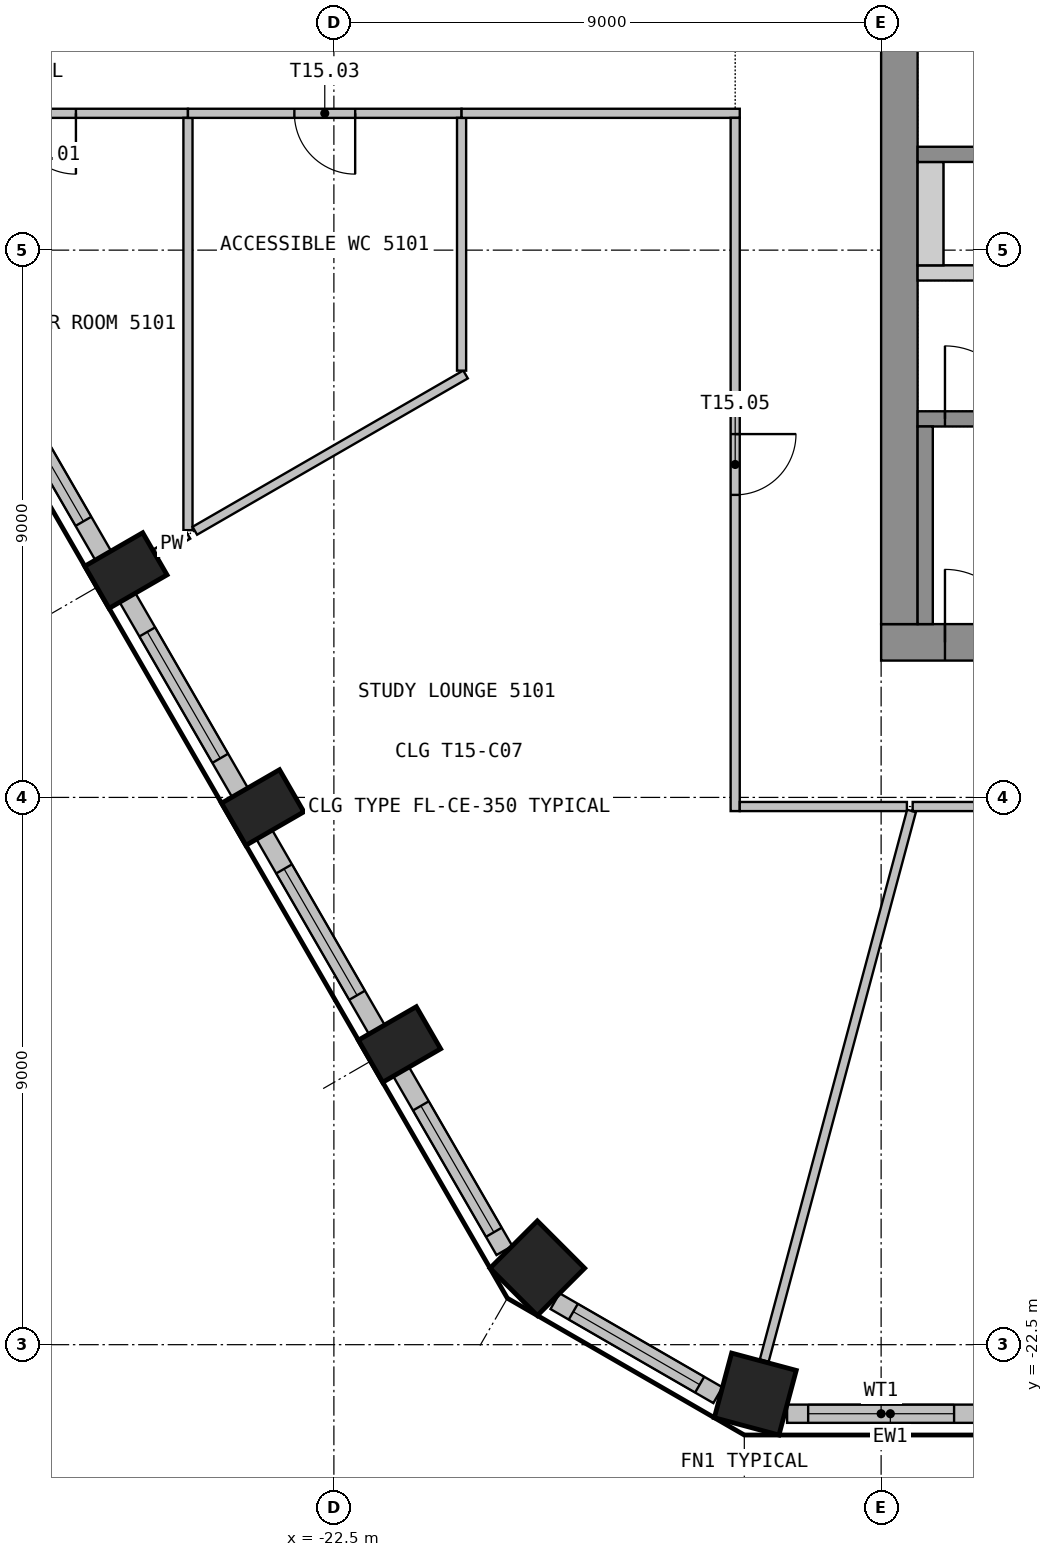
"""IFC4 building model, lengths in metres.
Left out: names, types, materials, properties, quantities, classifications, styles, units other than length and angle.
Written with IfcOpenShell. Run it as: python <this file> out.ifc"""

import sys

from ifc_helpers import new_model, si_unit, direction, frame, frame_2d, origin, origin_2d, place, context, subcontext, project, spatial, polyline, rectangle, outline, extrude, element, fill, save


model = new_model("IFC4")
c1 = context("Model", 3, precision=1e-05, world=origin(), true_north=direction((0.0, 1.0)))
c2 = subcontext(c1, "Body", "Model", "MODEL_VIEW")
j1 = project(units=[si_unit("LENGTHUNIT", "METRE"), si_unit("PLANEANGLEUNIT", "RADIAN")], contexts=[c1])
p1 = place(None, origin())
s1 = spatial("IfcSite", under=j1, at=p1, CompositionType="ELEMENT")
p2 = place(p1, origin())
s2 = spatial("IfcBuilding", under=s1, at=p2, CompositionType="ELEMENT")
p3 = place(p2, frame((0.0, 0.0, 207.3)))
s3 = spatial("IfcBuildingStorey", under=s2, at=p3, CompositionType="ELEMENT", Elevation=207.3)
p4 = place(p3, frame((-15.57, -23.312, 0.0), z_axis=(0.0, 0.0, 1.0), x_axis=(0.965925826289, -0.258819045103, 0.0)))
e1 = element("IfcColumn", 1, at=p4, inside=s3, PredefinedType="COLUMN", context=c2, shape_type="SweptSolid", body=[
    extrude(rectangle(XDim=1.1, YDim=1.1, at=origin_2d()), origin(), (0.0, 0.0, 1.0), 3.55),
])
for number, where, z_axis, x_axis in (
    (2, (-25.921, -9.769, 0.0), (0.0, 0.0, 1.0), (0.5, -0.866, 0.0)),
    (3, (-23.671, -13.666, 0.0), (0.0, 0.0, 1.0), (0.5, -0.866, 0.0)),
    (4, (-21.421, -17.563, 0.0), (0.0, 0.0, 1.0), (0.5, -0.866, 0.0)),
):
    element("IfcColumn", number, at=place(p3, frame(where, z_axis=z_axis, x_axis=x_axis)), inside=s3, PredefinedType="COLUMN", context=c2, shape_type="SweptSolid", body=[
        extrude(rectangle(XDim=0.8, YDim=1.1, at=origin_2d()), origin(), (0.0, 0.0, 1.0), 3.55),
    ])
p5 = place(p3, frame((-19.154, -21.242, 0.0), z_axis=(0.0, 0.0, 1.0), x_axis=(0.707106781187, -0.707106781187, 0.0)))
e5 = element("IfcColumn", 5, at=p5, inside=s3, PredefinedType="COLUMN", context=c2, shape_type="SweptSolid", body=[
    extrude(rectangle(XDim=1.1, YDim=1.1, at=origin_2d()), origin(), (0.0, 0.0, 1.0), 3.55),
])
p6 = place(p3, frame((-15.046, -23.635, 0.0), z_axis=(0.0, 0.0, 1.0), x_axis=(1.0, 0.0, 0.0)))
e6 = element("IfcWall", 6, at=p6, inside=s3, PredefinedType="SOLIDWALL", context=c2, shape_type="SweptSolid", body=[
    extrude(rectangle(XDim=3.396, YDim=0.3, at=frame_2d((1.698, 0.0))), origin(), (0.0, 0.0, 1.0), 3.55),
])
p7 = place(p6, frame((0.346, 0.0, 0.9)))
e7 = element("IfcOpeningElement", 7, at=p7, cuts=e6, PredefinedType="OPENING", context=c2, shape_type="SweptSolid", body=[
    extrude(rectangle(XDim=2.4, YDim=2.1, at=frame_2d((1.2, 1.05))), frame((0.0, 0.16, 0.0), z_axis=(0.0, -1.0, 0.0), x_axis=(1.0, 0.0, 0.0)), (0.0, 0.0, 1.0), 0.32),
])
p8 = place(p3, frame((-28.144, -6.319, 0.0), z_axis=(0.0, 0.0, 1.0), x_axis=(0.500029062817, -0.866008623709, 0.0)))
e8 = element("IfcWall", 8, at=p8, inside=s3, PredefinedType="SOLIDWALL", context=c2, shape_type="SweptSolid", body=[
    extrude(rectangle(XDim=3.699, YDim=0.3, at=frame_2d((1.85, 0.0))), origin(), (0.0, 0.0, 1.0), 3.55),
])
p9 = place(p8, frame((0.649, 0.0, 0.9)))
e9 = element("IfcOpeningElement", 9, at=p9, cuts=e8, PredefinedType="OPENING", context=c2, shape_type="SweptSolid", body=[
    extrude(rectangle(XDim=2.4, YDim=2.1, at=frame_2d((1.2, 1.05))), frame((0.0, 0.16, 0.0), z_axis=(0.0, -1.0, 0.0), x_axis=(1.0, 0.0, 0.0)), (0.0, 0.0, 1.0), 0.32),
])
p10 = place(p3, frame((-25.894, -10.216, 0.0), z_axis=(0.0, 0.0, 1.0), x_axis=(0.500029062817, -0.866008623709, 0.0)))
e10 = element("IfcWall", 10, at=p10, inside=s3, PredefinedType="SOLIDWALL", context=c2, shape_type="SweptSolid", body=[
    extrude(rectangle(XDim=3.699, YDim=0.3, at=frame_2d((1.85, 0.0))), origin(), (0.0, 0.0, 1.0), 3.55),
])
p11 = place(p10, frame((0.649, 0.0, 0.9)))
e11 = element("IfcOpeningElement", 11, at=p11, cuts=e10, PredefinedType="OPENING", context=c2, shape_type="SweptSolid", body=[
    extrude(rectangle(XDim=2.4, YDim=2.1, at=frame_2d((1.2, 1.05))), frame((0.0, 0.16, 0.0), z_axis=(0.0, -1.0, 0.0), x_axis=(1.0, 0.0, 0.0)), (0.0, 0.0, 1.0), 0.32),
])
p12 = place(p3, frame((-23.644, -14.113, 0.0), z_axis=(0.0, 0.0, 1.0), x_axis=(0.500029062817, -0.866008623709, 0.0)))
e12 = element("IfcWall", 12, at=p12, inside=s3, PredefinedType="SOLIDWALL", context=c2, shape_type="SweptSolid", body=[
    extrude(rectangle(XDim=3.699, YDim=0.3, at=frame_2d((1.85, 0.0))), origin(), (0.0, 0.0, 1.0), 3.55),
])
p13 = place(p12, frame((0.649, 0.0, 0.9)))
e13 = element("IfcOpeningElement", 13, at=p13, cuts=e12, PredefinedType="OPENING", context=c2, shape_type="SweptSolid", body=[
    extrude(rectangle(XDim=2.4, YDim=2.1, at=frame_2d((1.2, 1.05))), frame((0.0, 0.16, 0.0), z_axis=(0.0, -1.0, 0.0), x_axis=(1.0, 0.0, 0.0)), (0.0, 0.0, 1.0), 0.32),
])
p14 = place(p3, frame((-21.394, -18.01, 0.0), z_axis=(0.0, 0.0, 1.0), x_axis=(0.500012868213, -0.866017974191, 0.0)))
e14 = element("IfcWall", 14, at=p14, inside=s3, PredefinedType="SOLIDWALL", context=c2, shape_type="SweptSolid", body=[
    extrude(rectangle(XDim=3.396, YDim=0.3, at=frame_2d((1.698, 0.0))), origin(), (0.0, 0.0, 1.0), 3.55),
])
p15 = place(p14, frame((0.649, 0.0, 0.9)))
e15 = element("IfcOpeningElement", 15, at=p15, cuts=e14, PredefinedType="OPENING", context=c2, shape_type="SweptSolid", body=[
    extrude(rectangle(XDim=2.4, YDim=2.1, at=frame_2d((1.2, 1.05))), frame((0.0, 0.16, 0.0), z_axis=(0.0, -1.0, 0.0), x_axis=(1.0, 0.0, 0.0)), (0.0, 0.0, 1.0), 0.32),
])
p16 = place(p3, frame((-18.863, -21.784, 0.0), z_axis=(0.0, 0.0, 1.0), x_axis=(0.865994975416, -0.500052699777, 0.0)))
e16 = element("IfcWall", 16, at=p16, inside=s3, PredefinedType="SOLIDWALL", context=c2, shape_type="SweptSolid", body=[
    extrude(rectangle(XDim=3.093, YDim=0.3, at=frame_2d((1.546, 0.0))), origin(), (0.0, 0.0, 1.0), 3.55),
])
p17 = place(p16, frame((0.346, 0.0, 0.9)))
e17 = element("IfcOpeningElement", 17, at=p17, cuts=e16, PredefinedType="OPENING", context=c2, shape_type="SweptSolid", body=[
    extrude(rectangle(XDim=2.4, YDim=2.1, at=frame_2d((1.2, 1.05))), frame((0.0, 0.16, 0.0), z_axis=(0.0, -1.0, 0.0), x_axis=(1.0, 0.0, 0.0)), (0.0, 0.0, 1.0), 0.32),
])
p18 = place(p3, frame((-13.5, -10.95, 0.0), z_axis=(0.0, 0.0, 1.0), x_axis=(1.0, 0.0, 0.0)))
e18 = element("IfcWall", 18, at=p18, inside=s3, PredefinedType="SHEAR", context=c2, shape_type="SweptSolid", body=[
    extrude(rectangle(XDim=27.0, YDim=0.6, at=frame_2d((13.5, 0.0))), origin(), (0.0, 0.0, 1.0), 3.55),
])
p19 = place(p18, frame((12.3, 0.0, 0.0)))
e19 = element("IfcOpeningElement", 19, at=p19, cuts=e18, PredefinedType="OPENING", context=c2, shape_type="SweptSolid", body=[
    extrude(rectangle(XDim=2.4, YDim=2.1, at=frame_2d((1.2, 1.05))), frame((0.0, 0.31, 0.0), z_axis=(0.0, -1.0, 0.0), x_axis=(1.0, 0.0, 0.0)), (0.0, 0.0, 1.0), 0.62),
])
p20 = place(p18, frame((1.05, 0.0, 0.0)))
e20 = element("IfcOpeningElement", 20, at=p20, cuts=e18, PredefinedType="OPENING", context=c2, shape_type="SweptSolid", body=[
    extrude(rectangle(XDim=1.2, YDim=2.1, at=frame_2d((0.6, 1.05))), frame((0.0, 0.31, 0.0), z_axis=(0.0, -1.0, 0.0), x_axis=(1.0, 0.0, 0.0)), (0.0, 0.0, 1.0), 0.62),
])
p21 = place(p18, frame((24.75, 0.0, 0.0)))
e21 = element("IfcOpeningElement", 21, at=p21, cuts=e18, PredefinedType="OPENING", context=c2, shape_type="SweptSolid", body=[
    extrude(rectangle(XDim=1.2, YDim=2.1, at=frame_2d((0.6, 1.05))), frame((0.0, 0.31, 0.0), z_axis=(0.0, -1.0, 0.0), x_axis=(1.0, 0.0, 0.0)), (0.0, 0.0, 1.0), 0.62),
])
p22 = place(p3, frame((-13.2, -10.65, 0.0), z_axis=(0.0, 0.0, 1.0), x_axis=(0.0, 1.0, 0.0)))
e22 = element("IfcWall", 22, at=p22, inside=s3, PredefinedType="SHEAR", context=c2, shape_type="SweptSolid", body=[
    extrude(rectangle(XDim=21.3, YDim=0.6, at=frame_2d((10.65, 0.0))), origin(), (0.0, 0.0, 1.0), 3.55),
])
p23 = place(p22, frame((9.45, 0.0, 0.0)))
e23 = element("IfcOpeningElement", 23, at=p23, cuts=e22, PredefinedType="OPENING", context=c2, shape_type="SweptSolid", body=[
    extrude(rectangle(XDim=2.4, YDim=2.1, at=frame_2d((1.2, 1.05))), frame((0.0, 0.31, 0.0), z_axis=(0.0, -1.0, 0.0), x_axis=(1.0, 0.0, 0.0)), (0.0, 0.0, 1.0), 0.62),
])
p24 = place(p3, origin())
e24 = element("IfcWall", 24, at=p24, inside=s3, PredefinedType="SHEAR", context=c2, shape_type="SweptSolid", body=[
    extrude(outline(polyline([(-12.9, -5.0), (-4.075, -5.0), (-4.075, -4.75), (-12.9, -4.75), (-12.9, -5.0)])), origin(), (0.0, 0.0, 1.0), 3.55),
])
p25 = place(p3, origin())
e25 = element("IfcWall", 25, at=p25, inside=s3, PredefinedType="SHEAR", context=c2, shape_type="SweptSolid", body=[
    extrude(outline(polyline([(-12.9, -4.75), (-12.475, -4.75), (-12.475, -3.05), (-12.9, -3.05), (-12.9, -4.75)])), origin(), (0.0, 0.0, 1.0), 3.55),
])
p26 = place(p3, frame((-12.9, -2.925, 0.0), z_axis=(0.0, 0.0, 1.0), x_axis=(1.0, 0.0, 0.0)))
e26 = element("IfcWall", 26, at=p26, inside=s3, PredefinedType="SHEAR", context=c2, shape_type="SweptSolid", body=[
    extrude(rectangle(XDim=8.825, YDim=0.25, at=frame_2d((4.413, 0.0))), origin(), (0.0, 0.0, 1.0), 3.55),
])
p27 = place(p26, frame((1.1, 0.0, 0.0)))
e27 = element("IfcOpeningElement", 27, at=p27, cuts=e26, PredefinedType="OPENING", context=c2, shape_type="SweptSolid", body=[
    extrude(rectangle(XDim=1.2, YDim=2.1, at=frame_2d((0.6, 1.05))), frame((0.0, 0.135, 0.0), z_axis=(0.0, -1.0, 0.0), x_axis=(1.0, 0.0, 0.0)), (0.0, 0.0, 1.0), 0.27),
])
p28 = place(p26, frame((3.9, 0.0, 0.0)))
e28 = element("IfcOpeningElement", 28, at=p28, cuts=e26, PredefinedType="OPENING", context=c2, shape_type="SweptSolid", body=[
    extrude(rectangle(XDim=1.2, YDim=2.1, at=frame_2d((0.6, 1.05))), frame((0.0, 0.135, 0.0), z_axis=(0.0, -1.0, 0.0), x_axis=(1.0, 0.0, 0.0)), (0.0, 0.0, 1.0), 0.27),
])
p29 = place(p26, frame((6.7, 0.0, 0.0)))
e29 = element("IfcOpeningElement", 29, at=p29, cuts=e26, PredefinedType="OPENING", context=c2, shape_type="SweptSolid", body=[
    extrude(rectangle(XDim=1.2, YDim=2.1, at=frame_2d((0.6, 1.05))), frame((0.0, 0.135, 0.0), z_axis=(0.0, -1.0, 0.0), x_axis=(1.0, 0.0, 0.0)), (0.0, 0.0, 1.0), 0.27),
])
p30 = place(p3, frame((-12.9, -7.275, 0.0), z_axis=(0.0, 0.0, 1.0), x_axis=(1.0, 0.0, 0.0)))
e30 = element("IfcWall", 30, at=p30, inside=s3, PredefinedType="SHEAR", context=c2, shape_type="SweptSolid", body=[
    extrude(rectangle(XDim=10.1, YDim=0.25, at=frame_2d((5.05, 0.0))), origin(), (0.0, 0.0, 1.0), 3.55),
])
p31 = place(p30, frame((0.45, 0.0, 0.0)))
e31 = element("IfcOpeningElement", 31, at=p31, cuts=e30, PredefinedType="OPENING", context=c2, shape_type="SweptSolid", body=[
    extrude(rectangle(XDim=1.2, YDim=2.1, at=frame_2d((0.6, 1.05))), frame((0.0, 0.135, 0.0), z_axis=(0.0, -1.0, 0.0), x_axis=(1.0, 0.0, 0.0)), (0.0, 0.0, 1.0), 0.27),
])
p32 = place(p3, frame((-12.775, -10.65, 0.0), z_axis=(0.0, 0.0, 1.0), x_axis=(0.0, 1.0, 0.0)))
e32 = element("IfcWall", 32, at=p32, inside=s3, PredefinedType="SHEAR", context=c2, shape_type="SweptSolid", body=[
    extrude(rectangle(XDim=3.25, YDim=0.25, at=frame_2d((1.625, 0.0))), origin(), (0.0, 0.0, 1.0), 3.55),
])
p33 = place(p3, frame((-24.9, -2.25, 0.0), z_axis=(0.0, 0.0, 1.0), x_axis=(-1.0, 0.0, 0.0)))
e33 = element("IfcWall", 33, at=p33, inside=s3, PredefinedType="PARTITIONING", context=c2, shape_type="SweptSolid", body=[
    extrude(rectangle(XDim=4.685, YDim=0.15, at=frame_2d((2.343, 0.0))), origin(), (0.0, 0.0, 1.0), 3.55),
])
p34 = place(p33, frame((1.843, 0.0, 0.0)))
e34 = element("IfcOpeningElement", 34, at=p34, cuts=e33, PredefinedType="OPENING", context=c2, shape_type="SweptSolid", body=[
    extrude(rectangle(XDim=1.0, YDim=2.1, at=frame_2d((0.5, 1.05))), frame((0.0, 0.085, 0.0), z_axis=(0.0, -1.0, 0.0), x_axis=(1.0, 0.0, 0.0)), (0.0, 0.0, 1.0), 0.17),
])
p35 = place(p3, frame((-24.9, -9.18, 0.0), z_axis=(0.0, 0.0, 1.0), x_axis=(-0.86593842012, -0.50015062987, 0.0)))
e35 = element("IfcWall", 35, at=p35, inside=s3, PredefinedType="PARTITIONING", context=c2, shape_type="SweptSolid", body=[
    extrude(rectangle(XDim=0.609, YDim=0.15, at=frame_2d((0.304, 0.0))), origin(), (0.0, 0.0, 1.0), 3.55),
])
p36 = place(p3, frame((-24.9, -2.325, 0.0), z_axis=(0.0, 0.0, 1.0), x_axis=(0.0, -1.0, 0.0)))
e36 = element("IfcWall", 36, at=p36, inside=s3, PredefinedType="PARTITIONING", context=c2, shape_type="SweptSolid", body=[
    extrude(rectangle(XDim=6.78, YDim=0.15, at=frame_2d((3.39, 0.0))), origin(), (0.0, 0.0, 1.0), 3.55),
])
p37 = place(p3, frame((-20.335, -6.544, 0.0), z_axis=(0.0, 0.0, 1.0), x_axis=(-0.86602821796, -0.499995125673, 0.0)))
e37 = element("IfcWall", 37, at=p37, inside=s3, PredefinedType="PARTITIONING", context=c2, shape_type="SweptSolid", body=[
    extrude(rectangle(XDim=5.141, YDim=0.15, at=frame_2d((2.571, 0.0))), origin(), (0.0, 0.0, 1.0), 3.55),
])
p38 = place(p3, frame((-20.4, -2.25, 0.0), z_axis=(0.0, 0.0, 1.0), x_axis=(-1.0, 0.0, 0.0)))
e38 = element("IfcWall", 38, at=p38, inside=s3, PredefinedType="PARTITIONING", context=c2, shape_type="SweptSolid", body=[
    extrude(rectangle(XDim=4.5, YDim=0.15, at=frame_2d((2.25, 0.0))), origin(), (0.0, 0.0, 1.0), 3.55),
])
p39 = place(p38, frame((1.75, 0.0, 0.0)))
e39 = element("IfcOpeningElement", 39, at=p39, cuts=e38, PredefinedType="OPENING", context=c2, shape_type="SweptSolid", body=[
    extrude(rectangle(XDim=1.0, YDim=2.1, at=frame_2d((0.5, 1.05))), frame((0.0, 0.085, 0.0), z_axis=(0.0, -1.0, 0.0), x_axis=(1.0, 0.0, 0.0)), (0.0, 0.0, 1.0), 0.17),
])
p40 = place(p3, frame((-20.4, -2.325, 0.0), z_axis=(0.0, 0.0, 1.0), x_axis=(0.0, -1.0, 0.0)))
e40 = element("IfcWall", 40, at=p40, inside=s3, PredefinedType="PARTITIONING", context=c2, shape_type="SweptSolid", body=[
    extrude(rectangle(XDim=4.157, YDim=0.15, at=frame_2d((2.079, 0.0))), origin(), (0.0, 0.0, 1.0), 3.55),
])
p41 = place(p3, frame((-15.825, -2.25, 0.0), z_axis=(0.0, 0.0, 1.0), x_axis=(-1.0, 0.0, 0.0)))
e41 = element("IfcWall", 41, at=p41, inside=s3, PredefinedType="PARTITIONING", context=c2, shape_type="SweptSolid", body=[
    extrude(rectangle(XDim=4.575, YDim=0.15, at=frame_2d((2.288, 0.0))), origin(), (0.0, 0.0, 1.0), 3.55),
])
p42 = place(p3, frame((-15.9, -2.325, 0.0), z_axis=(0.0, 0.0, 1.0), x_axis=(0.0, -1.0, 0.0)))
e42 = element("IfcWall", 42, at=p42, inside=s3, PredefinedType="PARTITIONING", context=c2, shape_type="SweptSolid", body=[
    extrude(rectangle(XDim=11.4, YDim=0.15, at=frame_2d((5.7, 0.0))), origin(), (0.0, 0.0, 1.0), 3.55),
])
p43 = place(p42, frame((5.2, 0.0, 0.0)))
e43 = element("IfcOpeningElement", 43, at=p43, cuts=e42, PredefinedType="OPENING", context=c2, shape_type="SweptSolid", body=[
    extrude(rectangle(XDim=1.0, YDim=2.1, at=frame_2d((0.5, 1.05))), frame((0.0, 0.085, 0.0), z_axis=(0.0, -1.0, 0.0), x_axis=(1.0, 0.0, 0.0)), (0.0, 0.0, 1.0), 0.17),
])
p44 = place(p3, frame((-15.825, -13.65, 0.0), z_axis=(0.0, 0.0, 1.0), x_axis=(1.0, 0.0, 0.0)))
e44 = element("IfcWall", 44, at=p44, inside=s3, PredefinedType="PARTITIONING", context=c2, shape_type="SweptSolid", body=[
    extrude(rectangle(XDim=2.749, YDim=0.15, at=frame_2d((1.375, 0.0))), origin(), (0.0, 0.0, 1.0), 3.55),
])
p45 = place(p3, frame((-13.0, -13.722, 0.0), z_axis=(0.0, 0.0, 1.0), x_axis=(-0.258812157425, -0.96592767181, 0.0)))
e45 = element("IfcWall", 45, at=p45, inside=s3, PredefinedType="PARTITIONING", context=c2, shape_type="SweptSolid", body=[
    extrude(rectangle(XDim=9.358, YDim=0.15, at=frame_2d((4.679, 0.0))), origin(), (0.0, 0.0, 1.0), 3.55),
])
p46 = place(p3, frame((-12.981, -13.65, 0.0), z_axis=(0.0, 0.0, 1.0), x_axis=(1.0, 0.0, 0.0)))
e46 = element("IfcWall", 46, at=p46, inside=s3, PredefinedType="PARTITIONING", context=c2, shape_type="SweptSolid", body=[
    extrude(rectangle(XDim=15.231, YDim=0.15, at=frame_2d((7.615, 0.0))), origin(), (0.0, 0.0, 1.0), 3.55),
])
p47 = place(p46, frame((7.115, 0.0, 0.0)))
e47 = element("IfcOpeningElement", 47, at=p47, cuts=e46, PredefinedType="OPENING", context=c2, shape_type="SweptSolid", body=[
    extrude(rectangle(XDim=1.0, YDim=2.1, at=frame_2d((0.5, 1.05))), frame((0.0, 0.085, 0.0), z_axis=(0.0, -1.0, 0.0), x_axis=(1.0, 0.0, 0.0)), (0.0, 0.0, 1.0), 0.17),
])
p48 = place(p7, origin())
e48 = element("IfcWindow", 48, at=p48, inside=s3, PartitioningType="SINGLE_PANEL", PredefinedType="WINDOW", context=c2, shape_type="SweptSolid", body=[
    extrude(rectangle(XDim=2.4, YDim=2.1, at=frame_2d((1.2, 1.05))), frame((0.0, 0.03, 0.0), z_axis=(0.0, -1.0, 0.0), x_axis=(1.0, 0.0, 0.0)), (0.0, 0.0, 1.0), 0.06),
])
fill(e7, e48)
p49 = place(p9, origin())
e49 = element("IfcWindow", 49, at=p49, inside=s3, PartitioningType="SINGLE_PANEL", PredefinedType="WINDOW", context=c2, shape_type="SweptSolid", body=[
    extrude(rectangle(XDim=2.4, YDim=2.1, at=frame_2d((1.2, 1.05))), frame((0.0, 0.03, 0.0), z_axis=(0.0, -1.0, 0.0), x_axis=(1.0, 0.0, 0.0)), (0.0, 0.0, 1.0), 0.06),
])
fill(e9, e49)
p50 = place(p11, origin())
e50 = element("IfcWindow", 50, at=p50, inside=s3, PartitioningType="SINGLE_PANEL", PredefinedType="WINDOW", context=c2, shape_type="SweptSolid", body=[
    extrude(rectangle(XDim=2.4, YDim=2.1, at=frame_2d((1.2, 1.05))), frame((0.0, 0.03, 0.0), z_axis=(0.0, -1.0, 0.0), x_axis=(1.0, 0.0, 0.0)), (0.0, 0.0, 1.0), 0.06),
])
fill(e11, e50)
p51 = place(p13, origin())
e51 = element("IfcWindow", 51, at=p51, inside=s3, PartitioningType="SINGLE_PANEL", PredefinedType="WINDOW", context=c2, shape_type="SweptSolid", body=[
    extrude(rectangle(XDim=2.4, YDim=2.1, at=frame_2d((1.2, 1.05))), frame((0.0, 0.03, 0.0), z_axis=(0.0, -1.0, 0.0), x_axis=(1.0, 0.0, 0.0)), (0.0, 0.0, 1.0), 0.06),
])
fill(e13, e51)
p52 = place(p15, origin())
e52 = element("IfcWindow", 52, at=p52, inside=s3, PartitioningType="SINGLE_PANEL", PredefinedType="WINDOW", context=c2, shape_type="SweptSolid", body=[
    extrude(rectangle(XDim=2.4, YDim=2.1, at=frame_2d((1.2, 1.05))), frame((0.0, 0.03, 0.0), z_axis=(0.0, -1.0, 0.0), x_axis=(1.0, 0.0, 0.0)), (0.0, 0.0, 1.0), 0.06),
])
fill(e15, e52)
p53 = place(p17, origin())
e53 = element("IfcWindow", 53, at=p53, inside=s3, PartitioningType="SINGLE_PANEL", PredefinedType="WINDOW", context=c2, shape_type="SweptSolid", body=[
    extrude(rectangle(XDim=2.4, YDim=2.1, at=frame_2d((1.2, 1.05))), frame((0.0, 0.03, 0.0), z_axis=(0.0, -1.0, 0.0), x_axis=(1.0, 0.0, 0.0)), (0.0, 0.0, 1.0), 0.06),
])
fill(e17, e53)
p54 = place(p20, origin())
e54 = element("IfcDoor", 54, at=p54, inside=s3, OperationType="SINGLE_SWING_RIGHT", PredefinedType="DOOR", context=c2, shape_type="SweptSolid", body=[
    extrude(rectangle(XDim=1.2, YDim=2.1, at=frame_2d((0.6, 1.05))), frame((0.0, 0.025, 0.0), z_axis=(0.0, -1.0, 0.0), x_axis=(1.0, 0.0, 0.0)), (0.0, 0.0, 1.0), 0.05),
])
fill(e20, e54)
p55 = place(p31, origin())
e55 = element("IfcDoor", 55, at=p55, inside=s3, OperationType="SINGLE_SWING_LEFT", PredefinedType="DOOR", context=c2, shape_type="SweptSolid", body=[
    extrude(rectangle(XDim=1.2, YDim=2.1, at=frame_2d((0.6, 1.05))), frame((0.0, 0.025, 0.0), z_axis=(0.0, -1.0, 0.0), x_axis=(1.0, 0.0, 0.0)), (0.0, 0.0, 1.0), 0.05),
])
fill(e31, e55)
p56 = place(p34, origin())
e56 = element("IfcDoor", 56, at=p56, inside=s3, OperationType="SINGLE_SWING_RIGHT", PredefinedType="DOOR", context=c2, shape_type="SweptSolid", body=[
    extrude(rectangle(XDim=1.0, YDim=2.1, at=frame_2d((0.5, 1.05))), frame((0.0, 0.025, 0.0), z_axis=(0.0, -1.0, 0.0), x_axis=(1.0, 0.0, 0.0)), (0.0, 0.0, 1.0), 0.05),
])
fill(e34, e56)
p57 = place(p39, origin())
e57 = element("IfcDoor", 57, at=p57, inside=s3, OperationType="SINGLE_SWING_RIGHT", PredefinedType="DOOR", context=c2, shape_type="SweptSolid", body=[
    extrude(rectangle(XDim=1.0, YDim=2.1, at=frame_2d((0.5, 1.05))), frame((0.0, 0.025, 0.0), z_axis=(0.0, -1.0, 0.0), x_axis=(1.0, 0.0, 0.0)), (0.0, 0.0, 1.0), 0.05),
])
fill(e39, e57)
p58 = place(p43, origin())
e58 = element("IfcDoor", 58, at=p58, inside=s3, OperationType="SINGLE_SWING_LEFT", PredefinedType="DOOR", context=c2, shape_type="SweptSolid", body=[
    extrude(rectangle(XDim=1.0, YDim=2.1, at=frame_2d((0.5, 1.05))), frame((0.0, 0.025, 0.0), z_axis=(0.0, -1.0, 0.0), x_axis=(1.0, 0.0, 0.0)), (0.0, 0.0, 1.0), 0.05),
])
fill(e43, e58)
save(model, sys.argv[1])
